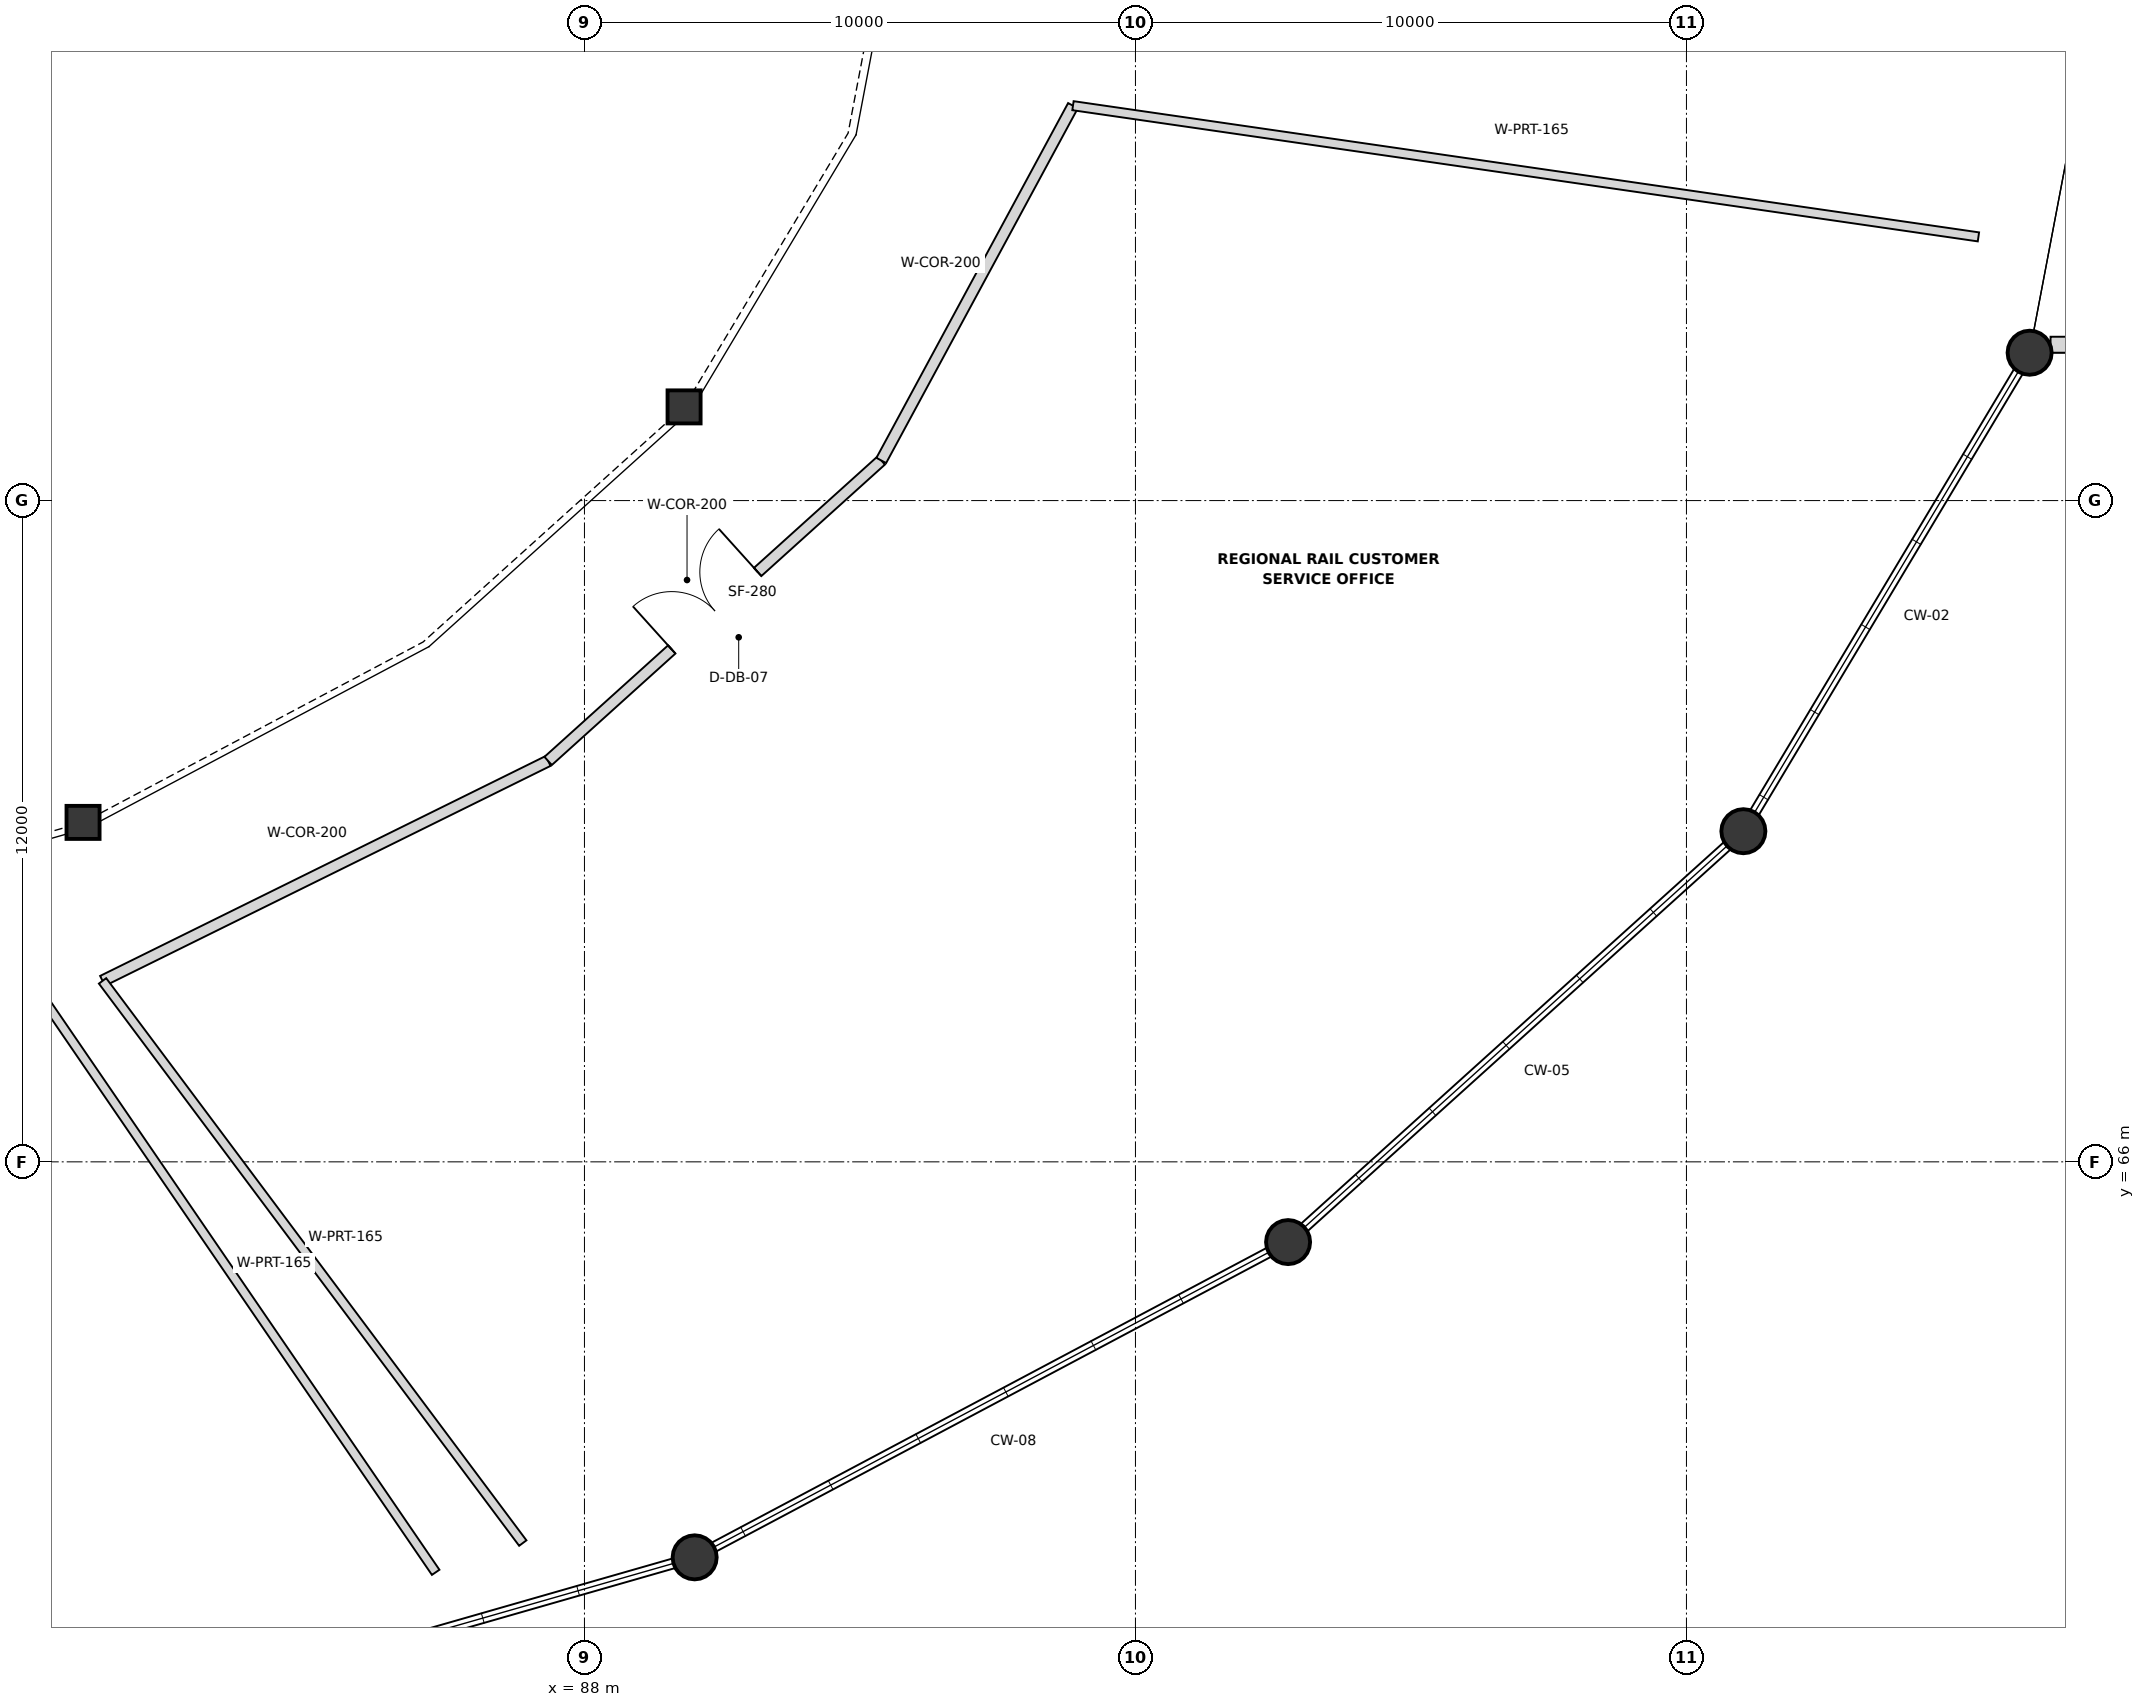
"""IFC4 building model, lengths in metres.
Left out: names, types, materials, properties, quantities, classifications, styles, units other than length and angle.
Written with IfcOpenShell. Run it as: python <this file> out.ifc"""

import sys

from ifc_helpers import new_model, si_unit, direction, frame, frame_2d, origin, origin_2d, place, context, subcontext, project, spatial, rectangle, circle, extrude, element, fill, save


model = new_model("IFC4")
c1 = context("Model", 3, precision=1e-05, world=origin(), true_north=direction((0.0, 1.0)))
c2 = subcontext(c1, "Body", "Model", "MODEL_VIEW")
j1 = project(units=[si_unit("LENGTHUNIT", "METRE"), si_unit("PLANEANGLEUNIT", "RADIAN")], contexts=[c1])
p1 = place(None, origin())
s1 = spatial("IfcSite", under=j1, at=p1, CompositionType="ELEMENT")
p2 = place(p1, origin())
s2 = spatial("IfcBuilding", under=s1, at=p2, CompositionType="ELEMENT")
p3 = place(p2, frame((0.0, 0.0, 5.4)))
s3 = spatial("IfcBuildingStorey", under=s2, at=p3, CompositionType="ELEMENT", Elevation=5.4)
for number, where, z_axis, x_axis in (
    (1, (90.0, 58.823, 0.0), (0.0, 0.0, 1.0), (1.0, 0.0, 0.0)),
    (2, (100.77, 64.544, 0.0), (0.0, 0.0, 1.0), (1.0, 0.0, 0.0)),
    (3, (109.033, 72.0, 0.0), (0.0, 0.0, 1.0), (1.0, 0.0, 0.0)),
    (4, (114.228, 80.683, 0.0), (0.0, 0.0, 1.0), (1.0, 0.0, 0.0)),
):
    element("IfcColumn", number, at=place(p3, frame(where, z_axis=z_axis, x_axis=x_axis)), inside=s3, PredefinedType="COLUMN", context=c2, shape_type="SweptSolid", body=[
        extrude(circle(Radius=0.4, at=origin_2d()), origin(), (0.0, 0.0, 1.0), 4.2),
    ])
for number, where, z_axis, x_axis in (
    (5, (78.9, 72.16, 0.0), (0.0, 0.0, 1.0), (1.0, 0.0, 0.0)),
    (6, (89.808, 79.7, 0.0), (0.0, 0.0, 1.0), (1.0, 0.0, 0.0)),
):
    element("IfcColumn", number, at=place(p3, frame(where, z_axis=z_axis, x_axis=x_axis)), inside=s3, PredefinedType="COLUMN", context=c2, shape_type="SweptSolid", body=[
        extrude(rectangle(XDim=0.6, YDim=0.6, at=origin_2d()), origin(), (0.0, 0.0, 1.0), 4.2),
    ])
p4 = place(p3, frame((117.65, 80.828, 0.0), z_axis=(0.0, 0.0, 1.0), x_axis=(-1.0, 0.0, 0.0)))
e7 = element("IfcWall", 7, at=p4, inside=s3, PredefinedType="SOLIDWALL", context=c2, shape_type="SweptSolid", body=[
    extrude(rectangle(XDim=3.042, YDim=0.29, at=frame_2d((1.521, 0.0))), origin(), (0.0, 0.0, 1.0), 3.4),
])
p5 = place(p3, frame((78.2, 68.928, 0.0), z_axis=(0.0, 0.0, 1.0), x_axis=(0.564688092093, -0.825304403628, 0.0)))
e8 = element("IfcWall", 8, at=p5, inside=s3, PredefinedType="PARTITIONING", context=c2, shape_type="SweptSolid", body=[
    extrude(rectangle(XDim=12.573, YDim=0.165, at=frame_2d((6.287, 0.0))), origin(), (0.0, 0.0, 1.0), 3.1),
])
p6 = place(p3, frame((79.254, 69.284, 0.0), z_axis=(0.0, 0.0, 1.0), x_axis=(0.89674859094, 0.442540353693, 0.0)))
e9 = element("IfcWall", 9, at=p6, inside=s3, PredefinedType="PARTITIONING", context=c2, shape_type="SweptSolid", body=[
    extrude(rectangle(XDim=9.018, YDim=0.2, at=frame_2d((4.509, 0.0))), origin(), (0.0, 0.0, 1.0), 3.1),
])
p7 = place(p3, frame((87.341, 73.275, 0.0), z_axis=(0.0, 0.0, 1.0), x_axis=(0.742572062939, 0.669766176619, 0.0)))
e10 = element("IfcWall", 10, at=p7, inside=s3, PredefinedType="PARTITIONING", context=c2, shape_type="SweptSolid", body=[
    extrude(rectangle(XDim=8.142, YDim=0.2, at=frame_2d((4.071, 0.0))), origin(), (0.0, 0.0, 1.0), 3.1),
])
p8 = place(p7, frame((3.021, 0.0, 0.0)))
e11 = element("IfcOpeningElement", 11, at=p8, cuts=e10, PredefinedType="OPENING", context=c2, shape_type="SweptSolid", body=[
    extrude(rectangle(XDim=2.1, YDim=2.3, at=frame_2d((1.05, 1.15))), frame((0.0, 0.11, 0.0), z_axis=(0.0, -1.0, 0.0), x_axis=(1.0, 0.0, 0.0)), (0.0, 0.0, 1.0), 0.22),
])
p9 = place(p3, frame((93.387, 78.728, 0.0), z_axis=(0.0, 0.0, 1.0), x_axis=(0.475412361353, 0.879763085536, 0.0)))
e12 = element("IfcWall", 12, at=p9, inside=s3, PredefinedType="PARTITIONING", context=c2, shape_type="SweptSolid", body=[
    extrude(rectangle(XDim=7.318, YDim=0.2, at=frame_2d((3.659, 0.0))), origin(), (0.0, 0.0, 1.0), 3.1),
])
p10 = place(p3, frame((79.254, 69.284, 0.0), z_axis=(0.0, 0.0, 1.0), x_axis=(0.598781846655, -0.800912167542, 0.0)))
e13 = element("IfcWall", 13, at=p10, inside=s3, PredefinedType="PARTITIONING", context=c2, shape_type="SweptSolid", body=[
    extrude(rectangle(XDim=12.738, YDim=0.165, at=frame_2d((6.369, 0.0))), origin(), (0.0, 0.0, 1.0), 3.1),
])
p11 = place(p3, frame((96.866, 85.166, 0.0), z_axis=(0.0, 0.0, 1.0), x_axis=(0.989664923878, -0.143399227493, 0.0)))
e14 = element("IfcWall", 14, at=p11, inside=s3, PredefinedType="PARTITIONING", context=c2, shape_type="SweptSolid", body=[
    extrude(rectangle(XDim=16.605, YDim=0.165, at=frame_2d((8.302, 0.0))), origin(), (0.0, 0.0, 1.0), 3.1),
])
p12 = place(p8, origin())
e15 = element("IfcDoor", 15, at=p12, inside=s3, OperationType="DOUBLE_DOOR_SINGLE_SWING", PredefinedType="DOOR", context=c2, shape_type="SweptSolid", body=[
    extrude(rectangle(XDim=2.1, YDim=2.3, at=frame_2d((1.05, 1.15))), frame((0.0, 0.025, 0.0), z_axis=(0.0, -1.0, 0.0), x_axis=(1.0, 0.0, 0.0)), (0.0, 0.0, 1.0), 0.05),
])
fill(e11, e15)
save(model, sys.argv[1])
